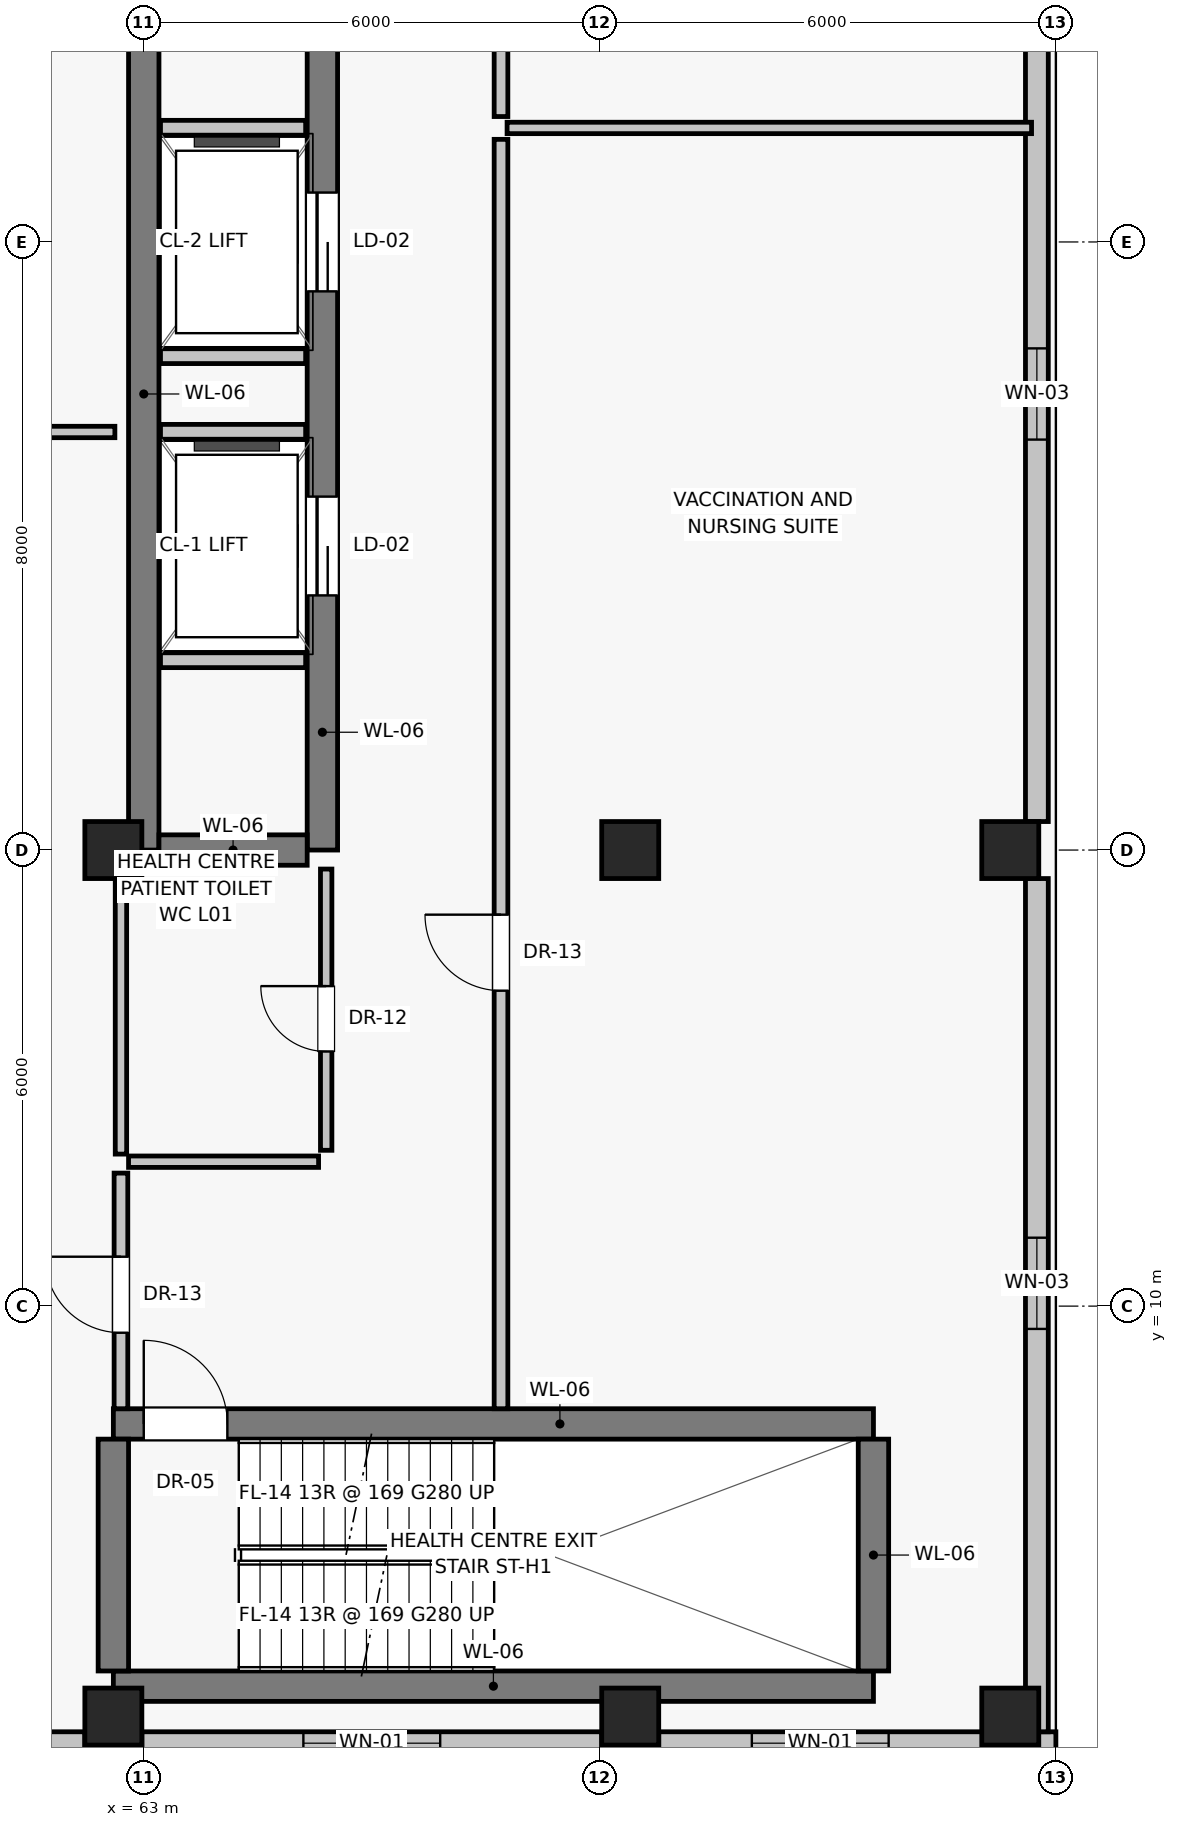
"""IFC4 building model, lengths in metres.
Left out: names, types, materials, properties, quantities, classifications, styles, units other than length and angle.
Written with IfcOpenShell. Run it as: python <this file> out.ifc"""

import sys

from ifc_helpers import new_model, si_unit, direction, frame, frame_2d, origin, origin_2d, place, context, subcontext, project, spatial, rectangle, extrude, source, transform, mapped, element, fill, save


model = new_model("IFC4")
c1 = context("Model", 3, precision=1e-05, world=origin(), true_north=direction((0.0, 1.0)))
c2 = subcontext(c1, "Body", "Model", "MODEL_VIEW")
j1 = project(units=[si_unit("LENGTHUNIT", "METRE"), si_unit("PLANEANGLEUNIT", "RADIAN")], contexts=[c1])
p1 = place(None, origin())
s1 = spatial("IfcSite", under=j1, at=p1, CompositionType="ELEMENT")
p2 = place(p1, origin())
s2 = spatial("IfcBuilding", under=s1, at=p2, CompositionType="ELEMENT")
p3 = place(p2, frame((0.0, 0.0, 5.2)))
s3 = spatial("IfcBuildingStorey", under=s2, at=p3, CompositionType="ELEMENT", Elevation=5.2)
for number, where, z_axis, x_axis in (
    (1, (62.6, 4.6, 0.0), (0.0, 0.0, 1.0), (1.0, 0.0, 0.0)),
    (2, (62.6, 16.0, 0.0), (0.0, 0.0, 1.0), (1.0, 0.0, 0.0)),
    (3, (69.4, 4.6, 0.0), (0.0, 0.0, 1.0), (1.0, 0.0, 0.0)),
    (4, (69.4, 16.0, 0.0), (0.0, 0.0, 1.0), (1.0, 0.0, 0.0)),
    (5, (74.4, 4.6, 0.0), (0.0, 0.0, 1.0), (1.0, 0.0, 0.0)),
    (6, (74.4, 16.0, 0.0), (0.0, 0.0, 1.0), (1.0, 0.0, 0.0)),
):
    element("IfcColumn", number, at=place(p3, frame(where, z_axis=z_axis, x_axis=x_axis)), inside=s3, PredefinedType="COLUMN", context=c2, shape_type="SweptSolid", body=[
        extrude(rectangle(XDim=0.75, YDim=0.75, at=origin_2d()), origin(), (0.0, 0.0, 1.0), 4.4),
    ])
p4 = place(p3, frame((57.0, 4.25, 0.0), z_axis=(0.0, 0.0, 1.0), x_axis=(1.0, 0.0, 0.0)))
e7 = element("IfcWall", 7, at=p4, inside=s3, PredefinedType="SOLIDWALL", context=c2, shape_type="SweptSolid", body=[
    extrude(rectangle(XDim=5.225, YDim=0.3, at=frame_2d((2.613, 0.0))), origin(), (0.0, 0.0, 1.0), 3.35),
])
p5 = place(p4, frame((2.2, 0.0, 0.85)))
e8 = element("IfcOpeningElement", 8, at=p5, cuts=e7, PredefinedType="OPENING", context=c2, shape_type="SweptSolid", body=[
    extrude(rectangle(XDim=1.8, YDim=1.65, at=frame_2d((0.9, 0.825))), frame((0.0, 0.16, 0.0), z_axis=(0.0, -1.0, 0.0), x_axis=(1.0, 0.0, 0.0)), (0.0, 0.0, 1.0), 0.32),
])
p6 = place(p3, frame((62.975, 4.25, 0.0), z_axis=(0.0, 0.0, 1.0), x_axis=(1.0, 0.0, 0.0)))
e9 = element("IfcWall", 9, at=p6, inside=s3, PredefinedType="SOLIDWALL", context=c2, shape_type="SweptSolid", body=[
    extrude(rectangle(XDim=6.05, YDim=0.3, at=frame_2d((3.025, 0.0))), origin(), (0.0, 0.0, 1.0), 3.35),
])
p7 = place(p6, frame((2.125, 0.0, 0.85)))
e10 = element("IfcOpeningElement", 10, at=p7, cuts=e9, PredefinedType="OPENING", context=c2, shape_type="SweptSolid", body=[
    extrude(rectangle(XDim=1.8, YDim=1.65, at=frame_2d((0.9, 0.825))), frame((0.0, 0.16, 0.0), z_axis=(0.0, -1.0, 0.0), x_axis=(1.0, 0.0, 0.0)), (0.0, 0.0, 1.0), 0.32),
])
p8 = place(p3, frame((69.775, 4.25, 0.0), z_axis=(0.0, 0.0, 1.0), x_axis=(1.0, 0.0, 0.0)))
e11 = element("IfcWall", 11, at=p8, inside=s3, PredefinedType="SOLIDWALL", context=c2, shape_type="SweptSolid", body=[
    extrude(rectangle(XDim=5.225, YDim=0.3, at=frame_2d((2.613, 0.0))), origin(), (0.0, 0.0, 1.0), 3.35),
])
p9 = place(p8, frame((1.225, 0.0, 0.85)))
e12 = element("IfcOpeningElement", 12, at=p9, cuts=e11, PredefinedType="OPENING", context=c2, shape_type="SweptSolid", body=[
    extrude(rectangle(XDim=1.8, YDim=1.65, at=frame_2d((0.9, 0.825))), frame((0.0, 0.16, 0.0), z_axis=(0.0, -1.0, 0.0), x_axis=(1.0, 0.0, 0.0)), (0.0, 0.0, 1.0), 0.32),
])
p10 = place(p3, frame((74.75, 4.4, 0.0), z_axis=(0.0, 0.0, 1.0), x_axis=(0.0, 1.0, 0.0)))
e13 = element("IfcWall", 13, at=p10, inside=s3, PredefinedType="SOLIDWALL", context=c2, shape_type="SweptSolid", body=[
    extrude(rectangle(XDim=11.225, YDim=0.3, at=frame_2d((5.613, 0.0))), origin(), (0.0, 0.0, 1.0), 3.35),
])
p11 = place(p10, frame((5.3, 0.0, 0.95)))
e14 = element("IfcOpeningElement", 14, at=p11, cuts=e13, PredefinedType="OPENING", context=c2, shape_type="SweptSolid", body=[
    extrude(rectangle(XDim=1.2, YDim=1.5, at=frame_2d((0.6, 0.75))), frame((0.0, 0.16, 0.0), z_axis=(0.0, -1.0, 0.0), x_axis=(1.0, 0.0, 0.0)), (0.0, 0.0, 1.0), 0.32),
])
p12 = place(p3, frame((74.75, 16.375, 0.0), z_axis=(0.0, 0.0, 1.0), x_axis=(0.0, 1.0, 0.0)))
e15 = element("IfcWall", 15, at=p12, inside=s3, PredefinedType="SOLIDWALL", context=c2, shape_type="SweptSolid", body=[
    extrude(rectangle(XDim=11.25, YDim=0.3, at=frame_2d((5.625, 0.0))), origin(), (0.0, 0.0, 1.0), 3.35),
])
p13 = place(p12, frame((5.025, 0.0, 0.95)))
e16 = element("IfcOpeningElement", 16, at=p13, cuts=e15, PredefinedType="OPENING", context=c2, shape_type="SweptSolid", body=[
    extrude(rectangle(XDim=1.2, YDim=1.5, at=frame_2d((0.6, 0.75))), frame((0.0, 0.16, 0.0), z_axis=(0.0, -1.0, 0.0), x_axis=(1.0, 0.0, 0.0)), (0.0, 0.0, 1.0), 0.32),
])
p14 = place(p3, frame((63.0, 16.0, 0.0), z_axis=(0.0, 0.0, 1.0), x_axis=(0.0, 1.0, 0.0)))
e17 = element("IfcWall", 17, at=p14, inside=s3, PredefinedType="SHEAR", context=c2, shape_type="SweptSolid", body=[
    extrude(rectangle(XDim=12.0, YDim=0.4, at=frame_2d((6.0, 0.0))), origin(), (0.0, 0.0, 1.0), 4.1),
])
p15 = place(p3, frame((65.35, 16.0, 0.0), z_axis=(0.0, 0.0, 1.0), x_axis=(0.0, 1.0, 0.0)))
e18 = element("IfcWall", 18, at=p15, inside=s3, PredefinedType="SHEAR", context=c2, shape_type="SweptSolid", body=[
    extrude(rectangle(XDim=12.0, YDim=0.4, at=frame_2d((6.0, 0.0))), origin(), (0.0, 0.0, 1.0), 4.1),
])
p16 = place(p15, frame((3.35, 0.0, 0.0)))
e19 = element("IfcOpeningElement", 19, at=p16, cuts=e18, PredefinedType="OPENING", context=c2, shape_type="SweptSolid", body=[
    extrude(rectangle(XDim=1.3, YDim=2.25, at=frame_2d((0.65, 1.125))), frame((0.0, 0.21, 0.0), z_axis=(0.0, -1.0, 0.0), x_axis=(1.0, 0.0, 0.0)), (0.0, 0.0, 1.0), 0.42),
])
p17 = place(p15, frame((7.35, 0.0, 0.0)))
e20 = element("IfcOpeningElement", 20, at=p17, cuts=e18, PredefinedType="OPENING", context=c2, shape_type="SweptSolid", body=[
    extrude(rectangle(XDim=1.3, YDim=2.25, at=frame_2d((0.65, 1.125))), frame((0.0, 0.21, 0.0), z_axis=(0.0, -1.0, 0.0), x_axis=(1.0, 0.0, 0.0)), (0.0, 0.0, 1.0), 0.42),
])
p18 = place(p3, frame((63.2, 16.0, 0.0), z_axis=(0.0, 0.0, 1.0), x_axis=(1.0, 0.0, 0.0)))
e21 = element("IfcWall", 21, at=p18, inside=s3, PredefinedType="SHEAR", context=c2, shape_type="SweptSolid", body=[
    extrude(rectangle(XDim=1.95, YDim=0.4, at=frame_2d((0.975, 0.0))), origin(), (0.0, 0.0, 1.0), 4.1),
])
for number, where, z_axis, x_axis in (
    (22, (63.22, 18.5, 0.0), (0.0, 0.0, 1.0), (1.0, 0.0, 0.0)),
    (23, (63.22, 21.5, 0.0), (0.0, 0.0, 1.0), (1.0, 0.0, 0.0)),
    (24, (63.22, 22.5, 0.0), (0.0, 0.0, 1.0), (1.0, 0.0, 0.0)),
    (25, (63.22, 25.5, 0.0), (0.0, 0.0, 1.0), (1.0, 0.0, 0.0)),
):
    element("IfcWall", number, at=place(p3, frame(where, z_axis=z_axis, x_axis=x_axis)), inside=s3, PredefinedType="SOLIDWALL", context=c2, shape_type="SweptSolid", body=[
        extrude(rectangle(XDim=1.91, YDim=0.2, at=frame_2d((0.955, 0.0))), origin(), (0.0, 0.0, 1.0), 4.1),
    ])
p19 = place(p3, frame((62.6, 5.0, 0.0), z_axis=(0.0, 0.0, 1.0), x_axis=(1.0, 0.0, 0.0)))
e26 = element("IfcWall", 26, at=p19, inside=s3, PredefinedType="SHEAR", context=c2, shape_type="SweptSolid", body=[
    extrude(rectangle(XDim=10.0, YDim=0.4, at=frame_2d((5.0, 0.0))), origin(), (0.0, 0.0, 1.0), 4.1),
])
p20 = place(p3, frame((62.6, 8.45, 0.0), z_axis=(0.0, 0.0, 1.0), x_axis=(1.0, 0.0, 0.0)))
e27 = element("IfcWall", 27, at=p20, inside=s3, PredefinedType="SHEAR", context=c2, shape_type="SweptSolid", body=[
    extrude(rectangle(XDim=10.0, YDim=0.4, at=frame_2d((5.0, 0.0))), origin(), (0.0, 0.0, 1.0), 4.1),
])
p21 = place(p20, frame((0.4, 0.0, 0.0)))
e28 = element("IfcOpeningElement", 28, at=p21, cuts=e27, PredefinedType="OPENING", context=c2, shape_type="SweptSolid", body=[
    extrude(rectangle(XDim=1.1, YDim=2.03, at=frame_2d((0.55, 1.015))), frame((0.0, 0.21, 0.0), z_axis=(0.0, -1.0, 0.0), x_axis=(1.0, 0.0, 0.0)), (0.0, 0.0, 1.0), 0.42),
])
for number, where, z_axis, x_axis in (
    (29, (62.6, 5.2, 0.0), (0.0, 0.0, 1.0), (0.0, 1.0, 0.0)),
    (30, (72.6, 5.2, 0.0), (0.0, 0.0, 1.0), (0.0, 1.0, 0.0)),
):
    element("IfcWall", number, at=place(p3, frame(where, z_axis=z_axis, x_axis=x_axis)), inside=s3, PredefinedType="SHEAR", context=c2, shape_type="SweptSolid", body=[
        extrude(rectangle(XDim=3.05, YDim=0.4, at=frame_2d((1.525, 0.0))), origin(), (0.0, 0.0, 1.0), 4.1),
    ])
p22 = place(p3, frame((62.8, 11.9, 0.0), z_axis=(0.0, 0.0, 1.0), x_axis=(1.0, 0.0, 0.0)))
e31 = element("IfcWall", 31, at=p22, inside=s3, PredefinedType="PARTITIONING", context=c2, shape_type="SweptSolid", body=[
    extrude(rectangle(XDim=2.5, YDim=0.15, at=frame_2d((1.25, 0.0))), origin(), (0.0, 0.0, 1.0), 4.1),
])
p23 = place(p3, frame((62.7, 12.0, 0.0), z_axis=(0.0, 0.0, 1.0), x_axis=(0.0, 1.0, 0.0)))
e32 = element("IfcWall", 32, at=p23, inside=s3, PredefinedType="PARTITIONING", context=c2, shape_type="SweptSolid", body=[
    extrude(rectangle(XDim=3.8, YDim=0.15, at=frame_2d((1.9, 0.0))), origin(), (0.0, 0.0, 1.0), 3.5),
])
p24 = place(p3, frame((65.4, 12.05, 0.0), z_axis=(0.0, 0.0, 1.0), x_axis=(0.0, 1.0, 0.0)))
e33 = element("IfcWall", 33, at=p24, inside=s3, PredefinedType="PARTITIONING", context=c2, shape_type="SweptSolid", body=[
    extrude(rectangle(XDim=3.7, YDim=0.15, at=frame_2d((1.85, 0.0))), origin(), (0.0, 0.0, 1.0), 4.1),
])
p25 = place(p24, frame((1.3, 0.0, 0.0)))
e34 = element("IfcOpeningElement", 34, at=p25, cuts=e33, PredefinedType="OPENING", context=c2, shape_type="SweptSolid", body=[
    extrude(rectangle(XDim=0.86, YDim=2.01, at=frame_2d((0.43, 1.005))), frame((0.0, 0.085, 0.0), z_axis=(0.0, -1.0, 0.0), x_axis=(1.0, 0.0, 0.0)), (0.0, 0.0, 1.0), 0.17),
])
p26 = place(p3, frame((62.7, 8.65, 0.0), z_axis=(0.0, 0.0, 1.0), x_axis=(0.0, 1.0, 0.0)))
e35 = element("IfcWall", 35, at=p26, inside=s3, PredefinedType="PARTITIONING", context=c2, shape_type="SweptSolid", body=[
    extrude(rectangle(XDim=3.1, YDim=0.18, at=frame_2d((1.55, 0.0))), origin(), (0.0, 0.0, 1.0), 3.5),
])
p27 = place(p26, frame((1.0, 0.0, 0.0)))
e36 = element("IfcOpeningElement", 36, at=p27, cuts=e35, PredefinedType="OPENING", context=c2, shape_type="SweptSolid", body=[
    extrude(rectangle(XDim=1.0, YDim=2.01, at=frame_2d((0.5, 1.005))), frame((0.0, 0.1, 0.0), z_axis=(0.0, -1.0, 0.0), x_axis=(1.0, 0.0, 0.0)), (0.0, 0.0, 1.0), 0.2),
])
p28 = place(p3, frame((57.32, 21.5, 0.0), z_axis=(0.0, 0.0, 1.0), x_axis=(1.0, 0.0, 0.0)))
e37 = element("IfcWall", 37, at=p28, inside=s3, PredefinedType="PARTITIONING", context=c2, shape_type="SweptSolid", body=[
    extrude(rectangle(XDim=5.3, YDim=0.15, at=frame_2d((2.65, 0.0))), origin(), (0.0, 0.0, 1.0), 4.1),
])
p29 = place(p3, frame((67.7, 8.65, 0.0), z_axis=(0.0, 0.0, 1.0), x_axis=(0.0, 1.0, 0.0)))
e38 = element("IfcWall", 38, at=p29, inside=s3, PredefinedType="PARTITIONING", context=c2, shape_type="SweptSolid", body=[
    extrude(rectangle(XDim=16.7, YDim=0.18, at=frame_2d((8.35, 0.0))), origin(), (0.0, 0.0, 1.0), 4.1),
])
p30 = place(p29, frame((5.5, 0.0, 0.0)))
e39 = element("IfcOpeningElement", 39, at=p30, cuts=e38, PredefinedType="OPENING", context=c2, shape_type="SweptSolid", body=[
    extrude(rectangle(XDim=1.0, YDim=2.01, at=frame_2d((0.5, 1.005))), frame((0.0, 0.1, 0.0), z_axis=(0.0, -1.0, 0.0), x_axis=(1.0, 0.0, 0.0)), (0.0, 0.0, 1.0), 0.2),
])
p31 = place(p3, frame((67.7, 25.65, 0.0), z_axis=(0.0, 0.0, 1.0), x_axis=(0.0, 1.0, 0.0)))
e40 = element("IfcWall", 40, at=p31, inside=s3, PredefinedType="PARTITIONING", context=c2, shape_type="SweptSolid", body=[
    extrude(rectangle(XDim=13.7, YDim=0.18, at=frame_2d((6.85, 0.0))), origin(), (0.0, 0.0, 1.0), 4.1),
])
p32 = place(p31, frame((5.5, 0.0, 0.0)))
e41 = element("IfcOpeningElement", 41, at=p32, cuts=e40, PredefinedType="OPENING", context=c2, shape_type="SweptSolid", body=[
    extrude(rectangle(XDim=1.0, YDim=2.01, at=frame_2d((0.5, 1.005))), frame((0.0, 0.1, 0.0), z_axis=(0.0, -1.0, 0.0), x_axis=(1.0, 0.0, 0.0)), (0.0, 0.0, 1.0), 0.2),
])
p33 = place(p3, frame((67.78, 25.5, 0.0), z_axis=(0.0, 0.0, 1.0), x_axis=(1.0, 0.0, 0.0)))
e42 = element("IfcWall", 42, at=p33, inside=s3, PredefinedType="PARTITIONING", context=c2, shape_type="SweptSolid", body=[
    extrude(rectangle(XDim=6.9, YDim=0.15, at=frame_2d((3.45, 0.0))), origin(), (0.0, 0.0, 1.0), 4.1),
])
m1 = source(origin(), c2, "Body", "SweptSolid", [
    extrude(rectangle(XDim=1.8, YDim=1.65, at=frame_2d((0.9, 0.825))), frame((0.0, 0.03, 0.0), z_axis=(0.0, -1.0, 0.0), x_axis=(1.0, 0.0, 0.0)), (0.0, 0.0, 1.0), 0.06),
])
p34 = place(p7, origin())
e43 = element("IfcWindow", 43, at=p34, inside=s3, PartitioningType="DOUBLE_PANEL_VERTICAL", PredefinedType="WINDOW", context=c2, shape_type="MappedRepresentation", body=[
    mapped(m1, transform((0.0, 0.0, 0.0), scale=1.0)),
])
fill(e10, e43)
p35 = place(p9, origin())
e44 = element("IfcWindow", 44, at=p35, inside=s3, PartitioningType="DOUBLE_PANEL_VERTICAL", PredefinedType="WINDOW", context=c2, shape_type="MappedRepresentation", body=[
    mapped(m1, transform((0.0, 0.0, 0.0), scale=1.0)),
])
fill(e12, e44)
m2 = source(origin(), c2, "Body", "SweptSolid", [
    extrude(rectangle(XDim=1.2, YDim=1.5, at=frame_2d((0.6, 0.75))), frame((0.0, 0.03, 0.0), z_axis=(0.0, -1.0, 0.0), x_axis=(1.0, 0.0, 0.0)), (0.0, 0.0, 1.0), 0.06),
])
p36 = place(p11, origin())
e45 = element("IfcWindow", 45, at=p36, inside=s3, PartitioningType="SINGLE_PANEL", PredefinedType="WINDOW", context=c2, shape_type="MappedRepresentation", body=[
    mapped(m2, transform((0.0, 0.0, 0.0), scale=1.0)),
])
fill(e14, e45)
p37 = place(p13, origin())
e46 = element("IfcWindow", 46, at=p37, inside=s3, PartitioningType="SINGLE_PANEL", PredefinedType="WINDOW", context=c2, shape_type="MappedRepresentation", body=[
    mapped(m2, transform((0.0, 0.0, 0.0), scale=1.0)),
])
fill(e16, e46)
m3 = source(origin(), c2, "Body", "SweptSolid", [
    extrude(rectangle(XDim=1.3, YDim=2.25, at=frame_2d((0.65, 1.125))), frame((0.0, 0.025, 0.0), z_axis=(0.0, -1.0, 0.0), x_axis=(1.0, 0.0, 0.0)), (0.0, 0.0, 1.0), 0.05),
])
p38 = place(p16, origin())
e47 = element("IfcDoor", 47, at=p38, inside=s3, OperationType="SLIDING_TO_LEFT", PredefinedType="DOOR", context=c2, shape_type="MappedRepresentation", body=[
    mapped(m3, transform((0.0, 0.0, 0.0), scale=1.0)),
])
fill(e19, e47)
p39 = place(p17, origin())
e48 = element("IfcDoor", 48, at=p39, inside=s3, OperationType="SLIDING_TO_LEFT", PredefinedType="DOOR", context=c2, shape_type="MappedRepresentation", body=[
    mapped(m3, transform((0.0, 0.0, 0.0), scale=1.0)),
])
fill(e20, e48)
m4 = source(origin(), c2, "Body", "SweptSolid", [
    extrude(rectangle(XDim=1.1, YDim=2.03, at=frame_2d((0.55, 1.015))), frame((0.0, 0.025, 0.0), z_axis=(0.0, -1.0, 0.0), x_axis=(1.0, 0.0, 0.0)), (0.0, 0.0, 1.0), 0.05),
])
p40 = place(p21, origin())
e49 = element("IfcDoor", 49, at=p40, inside=s3, OperationType="SINGLE_SWING_LEFT", PredefinedType="DOOR", context=c2, shape_type="MappedRepresentation", body=[
    mapped(m4, transform((0.0, 0.0, 0.0), scale=1.0)),
])
fill(e28, e49)
m5 = source(origin(), c2, "Body", "SweptSolid", [
    extrude(rectangle(XDim=0.86, YDim=2.01, at=frame_2d((0.43, 1.005))), frame((0.0, 0.025, 0.0), z_axis=(0.0, -1.0, 0.0), x_axis=(1.0, 0.0, 0.0)), (0.0, 0.0, 1.0), 0.05),
])
p41 = place(p25, origin())
e50 = element("IfcDoor", 50, at=p41, inside=s3, OperationType="SINGLE_SWING_RIGHT", PredefinedType="DOOR", context=c2, shape_type="MappedRepresentation", body=[
    mapped(m5, transform((0.0, 0.0, 0.0), scale=1.0)),
])
fill(e34, e50)
m6 = source(origin(), c2, "Body", "SweptSolid", [
    extrude(rectangle(XDim=1.0, YDim=2.01, at=frame_2d((0.5, 1.005))), frame((0.0, 0.025, 0.0), z_axis=(0.0, -1.0, 0.0), x_axis=(1.0, 0.0, 0.0)), (0.0, 0.0, 1.0), 0.05),
])
p42 = place(p27, origin())
e51 = element("IfcDoor", 51, at=p42, inside=s3, OperationType="SINGLE_SWING_RIGHT", PredefinedType="DOOR", context=c2, shape_type="MappedRepresentation", body=[
    mapped(m6, transform((0.0, 0.0, 0.0), scale=1.0)),
])
fill(e36, e51)
p43 = place(p30, origin())
e52 = element("IfcDoor", 52, at=p43, inside=s3, OperationType="SINGLE_SWING_RIGHT", PredefinedType="DOOR", context=c2, shape_type="MappedRepresentation", body=[
    mapped(m6, transform((0.0, 0.0, 0.0), scale=1.0)),
])
fill(e39, e52)
save(model, sys.argv[1])
